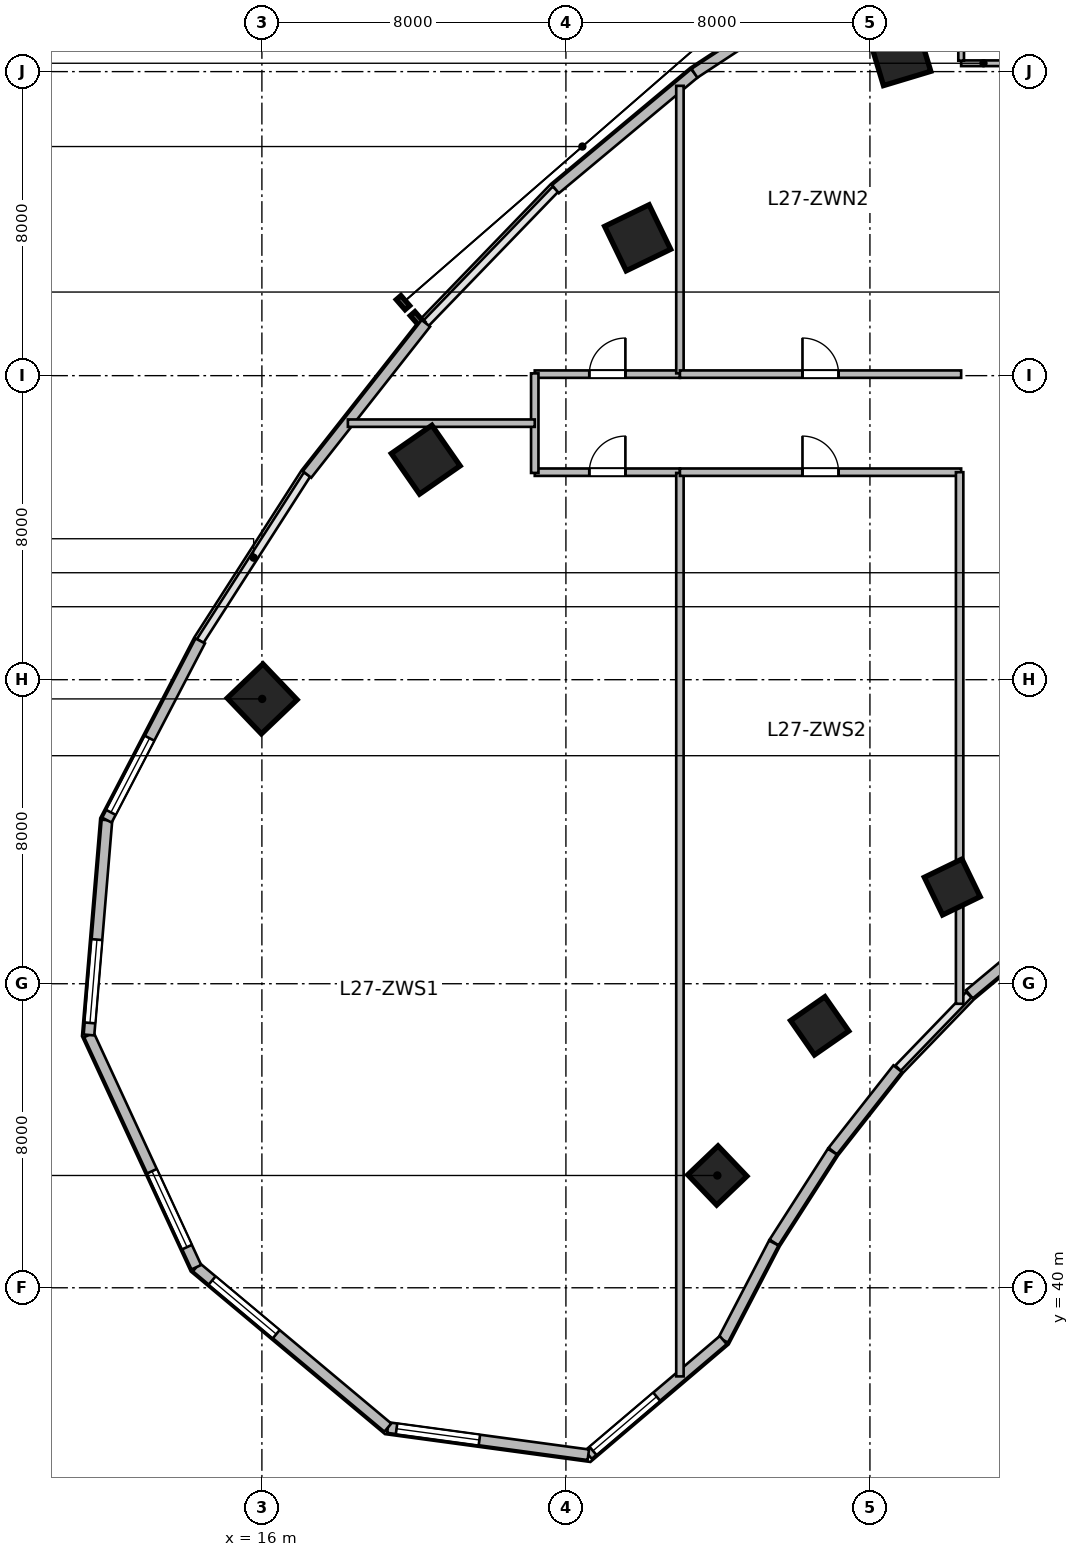
"""IFC4 building model, lengths in metres.
Left out: names, types, materials, properties, quantities, classifications, styles, units other than length and angle.
Written with IfcOpenShell. Run it as: python <this file> out.ifc"""

import sys

from ifc_helpers import new_model, si_unit, direction, frame, frame_2d, origin, origin_2d, place, context, subcontext, project, spatial, rectangle, extrude, source, transform, mapped, element, fill, save


model = new_model("IFC4")
c1 = context("Model", 3, precision=1e-05, world=origin(), true_north=direction((0.0, 1.0)))
c2 = subcontext(c1, "Body", "Model", "MODEL_VIEW")
j1 = project(units=[si_unit("LENGTHUNIT", "METRE"), si_unit("PLANEANGLEUNIT", "RADIAN")], contexts=[c1])
p1 = place(None, origin())
s1 = spatial("IfcSite", under=j1, at=p1, CompositionType="ELEMENT")
p2 = place(p1, origin())
s2 = spatial("IfcBuilding", under=s1, at=p2, CompositionType="ELEMENT")
p3 = place(p2, frame((0.0, 0.0, 115.5)))
s3 = spatial("IfcBuildingStorey", under=s2, at=p3, CompositionType="ELEMENT", Elevation=115.5)
m1 = source(origin(), c2, "Body", "SweptSolid", [
    extrude(rectangle(XDim=1.1, YDim=1.1, at=origin_2d()), origin(), (0.0, 0.0, 1.0), 3.9),
])
p4 = place(p3, frame((27.985, 42.955, 0.0), z_axis=(0.0, 0.0, 1.0), x_axis=(-0.690756218984, 0.723087716626, 0.0)))
e1 = element("IfcColumn", 1, at=p4, inside=s3, PredefinedType="COLUMN", context=c2, shape_type="MappedRepresentation", body=[
    mapped(m1, transform((0.0, 0.0, 0.0), scale=1.0)),
])
m2 = source(origin(), c2, "Body", "SweptSolid", [
    extrude(rectangle(XDim=1.3, YDim=1.3, at=origin_2d()), origin(), (0.0, 0.0, 1.0), 3.9),
])
p5 = place(p3, frame((16.007, 55.494, 0.0), z_axis=(0.0, 0.0, 1.0), x_axis=(-0.690756218984, 0.723087716626, 0.0)))
e2 = element("IfcColumn", 2, at=p5, inside=s3, PredefinedType="COLUMN", context=c2, shape_type="MappedRepresentation", body=[
    mapped(m2, transform((0.0, 0.0, 0.0), scale=1.0)),
])
p6 = place(p3, frame((30.677, 46.892, 0.0), z_axis=(0.0, 0.0, 1.0), x_axis=(-0.571143442153, 0.820850271661, 0.0)))
e3 = element("IfcColumn", 3, at=p6, inside=s3, PredefinedType="COLUMN", context=c2, shape_type="MappedRepresentation", body=[
    mapped(m1, transform((0.0, 0.0, 0.0), scale=1.0)),
])
p7 = place(p3, frame((20.311, 61.789, 0.0), z_axis=(0.0, 0.0, 1.0), x_axis=(-0.571143442153, 0.820850271661, 0.0)))
e4 = element("IfcColumn", 4, at=p7, inside=s3, PredefinedType="COLUMN", context=c2, shape_type="MappedRepresentation", body=[
    mapped(m2, transform((0.0, 0.0, 0.0), scale=1.0)),
])
p8 = place(p3, frame((34.166, 50.545, 0.0), z_axis=(0.0, 0.0, 1.0), x_axis=(-0.436173672171, 0.899862504889, 0.0)))
e5 = element("IfcColumn", 5, at=p8, inside=s3, PredefinedType="COLUMN", context=c2, shape_type="MappedRepresentation", body=[
    mapped(m1, transform((0.0, 0.0, 0.0), scale=1.0)),
])
for number, where, z_axis, x_axis in (
    (6, (25.888, 67.627, 0.0), (0.0, 0.0, 1.0), (-0.436, 0.9, 0.0)),
    (7, (32.791, 72.442, 0.0), (0.0, 0.0, 1.0), (-0.289, 0.957, 0.0)),
):
    element("IfcColumn", number, at=place(p3, frame(where, z_axis=z_axis, x_axis=x_axis)), inside=s3, PredefinedType="COLUMN", context=c2, shape_type="MappedRepresentation", body=[
        mapped(m2, transform((0.0, 0.0, 0.0), scale=1.0)),
    ])
m3 = source(origin(), c2, "Body", "SweptSolid", [
    extrude(rectangle(XDim=2.601, YDim=0.28, at=frame_2d((1.3, 0.0))), origin(), (0.0, 0.0, 1.0), 3.65),
])
p9 = place(p3, frame((36.613, 49.387, 0.0), z_axis=(0.0, 0.0, 1.0), x_axis=(-0.76796730295, -0.640489048775, 0.0)))
e8 = element("IfcWall", 8, at=p9, inside=s3, PredefinedType="SOLIDWALL", context=c2, shape_type="MappedRepresentation", body=[
    mapped(m3, transform((0.0, 0.0, 0.0), scale=1.0)),
])
m4 = source(origin(), c2, "Body", "SweptSolid", [
    extrude(rectangle(XDim=2.76, YDim=0.28, at=frame_2d((1.38, 0.0))), origin(), (0.0, 0.0, 1.0), 3.65),
])
p10 = place(p3, frame((32.728, 45.766, 0.0), z_axis=(0.0, 0.0, 1.0), x_axis=(-0.618180818641, -0.786035925047, 0.0)))
e9 = element("IfcWall", 9, at=p10, inside=s3, PredefinedType="SOLIDWALL", context=c2, shape_type="MappedRepresentation", body=[
    mapped(m4, transform((0.0, 0.0, 0.0), scale=1.0)),
])
m5 = source(origin(), c2, "Body", "SweptSolid", [
    extrude(rectangle(XDim=2.84, YDim=0.28, at=frame_2d((1.42, 0.0))), origin(), (0.0, 0.0, 1.0), 3.65),
])
p11 = place(p3, frame((31.011, 43.582, 0.0), z_axis=(0.0, 0.0, 1.0), x_axis=(-0.540214368057, -0.841527442538, 0.0)))
e10 = element("IfcWall", 10, at=p11, inside=s3, PredefinedType="SOLIDWALL", context=c2, shape_type="MappedRepresentation", body=[
    mapped(m5, transform((0.0, 0.0, 0.0), scale=1.0)),
])
m6 = source(origin(), c2, "Body", "SweptSolid", [
    extrude(rectangle(XDim=2.88, YDim=0.28, at=frame_2d((1.44, 0.0))), origin(), (0.0, 0.0, 1.0), 3.65),
])
p12 = place(p3, frame((29.469, 41.178, 0.0), z_axis=(0.0, 0.0, 1.0), x_axis=(-0.461769086658, -0.887000175088, 0.0)))
e11 = element("IfcWall", 11, at=p12, inside=s3, PredefinedType="SOLIDWALL", context=c2, shape_type="MappedRepresentation", body=[
    mapped(m6, transform((0.0, 0.0, 0.0), scale=1.0)),
])
m7 = source(origin(), c2, "Body", "SweptSolid", [
    extrude(rectangle(XDim=4.659, YDim=0.28, at=frame_2d((2.33, 0.0))), origin(), (0.0, 0.0, 1.0), 3.65),
])
p13 = place(p3, frame((28.139, 38.624, 0.0), z_axis=(0.0, 0.0, 1.0), x_axis=(-0.761913458795, -0.647678841176, 0.0)))
e12 = element("IfcWall", 12, at=p13, inside=s3, PredefinedType="SOLIDWALL", context=c2, shape_type="MappedRepresentation", body=[
    mapped(m7, transform((0.0, 0.0, 0.0), scale=1.0)),
])
p14 = place(p13, frame((2.299, 0.0, 0.95)))
e13 = element("IfcOpeningElement", 13, at=p14, cuts=e12, PredefinedType="OPENING", context=c2, shape_type="SweptSolid", body=[
    extrude(rectangle(XDim=2.2, YDim=2.1, at=frame_2d((1.1, 1.05))), frame((0.0, 0.15, 0.0), z_axis=(0.0, -1.0, 0.0), x_axis=(1.0, 0.0, 0.0)), (0.0, 0.0, 1.0), 0.3),
])
m8 = source(origin(), c2, "Body", "SweptSolid", [
    extrude(rectangle(XDim=5.324, YDim=0.28, at=frame_2d((2.662, 0.0))), origin(), (0.0, 0.0, 1.0), 3.65),
])
p15 = place(p3, frame((24.59, 35.606, 0.0), z_axis=(0.0, 0.0, 1.0), x_axis=(-0.990931467223, 0.134368252451, 0.0)))
e14 = element("IfcWall", 14, at=p15, inside=s3, PredefinedType="SOLIDWALL", context=c2, shape_type="MappedRepresentation", body=[
    mapped(m8, transform((0.0, 0.0, 0.0), scale=1.0)),
])
p16 = place(p15, frame((2.893, 0.0, 0.95)))
e15 = element("IfcOpeningElement", 15, at=p16, cuts=e14, PredefinedType="OPENING", context=c2, shape_type="SweptSolid", body=[
    extrude(rectangle(XDim=2.2, YDim=2.1, at=frame_2d((1.1, 1.05))), frame((0.0, 0.15, 0.0), z_axis=(0.0, -1.0, 0.0), x_axis=(1.0, 0.0, 0.0)), (0.0, 0.0, 1.0), 0.3),
])
m9 = source(origin(), c2, "Body", "SweptSolid", [
    extrude(rectangle(XDim=6.573, YDim=0.28, at=frame_2d((3.287, 0.0))), origin(), (0.0, 0.0, 1.0), 3.65),
])
p17 = place(p3, frame((19.314, 36.322, 0.0), z_axis=(0.0, 0.0, 1.0), x_axis=(-0.766715154163, 0.641987439423, 0.0)))
e16 = element("IfcWall", 16, at=p17, inside=s3, PredefinedType="SOLIDWALL", context=c2, shape_type="MappedRepresentation", body=[
    mapped(m9, transform((0.0, 0.0, 0.0), scale=1.0)),
])
p18 = place(p17, frame((3.83, 0.0, 0.95)))
e17 = element("IfcOpeningElement", 17, at=p18, cuts=e16, PredefinedType="OPENING", context=c2, shape_type="SweptSolid", body=[
    extrude(rectangle(XDim=2.2, YDim=2.1, at=frame_2d((1.1, 1.05))), frame((0.0, 0.15, 0.0), z_axis=(0.0, -1.0, 0.0), x_axis=(1.0, 0.0, 0.0)), (0.0, 0.0, 1.0), 0.3),
])
m10 = source(origin(), c2, "Body", "SweptSolid", [
    extrude(rectangle(XDim=6.732, YDim=0.28, at=frame_2d((3.366, 0.0))), origin(), (0.0, 0.0, 1.0), 3.65),
])
p19 = place(p3, frame((14.275, 40.541, 0.0), z_axis=(0.0, 0.0, 1.0), x_axis=(-0.419644552709, 0.907688520023, 0.0)))
e18 = element("IfcWall", 18, at=p19, inside=s3, PredefinedType="SOLIDWALL", context=c2, shape_type="MappedRepresentation", body=[
    mapped(m10, transform((0.0, 0.0, 0.0), scale=1.0)),
])
p20 = place(p19, frame((0.583, 0.0, 0.95)))
e19 = element("IfcOpeningElement", 19, at=p20, cuts=e18, PredefinedType="OPENING", context=c2, shape_type="SweptSolid", body=[
    extrude(rectangle(XDim=2.2, YDim=2.1, at=frame_2d((1.1, 1.05))), frame((0.0, 0.15, 0.0), z_axis=(0.0, -1.0, 0.0), x_axis=(1.0, 0.0, 0.0)), (0.0, 0.0, 1.0), 0.3),
])
m11 = source(origin(), c2, "Body", "SweptSolid", [
    extrude(rectangle(XDim=5.674, YDim=0.28, at=frame_2d((2.837, 0.0))), origin(), (0.0, 0.0, 1.0), 3.65),
])
p21 = place(p3, frame((11.45, 46.652, 0.0), z_axis=(0.0, 0.0, 1.0), x_axis=(0.083309007867, 0.996523762491, 0.0)))
e20 = element("IfcWall", 20, at=p21, inside=s3, PredefinedType="SOLIDWALL", context=c2, shape_type="MappedRepresentation", body=[
    mapped(m11, transform((0.0, 0.0, 0.0), scale=1.0)),
])
p22 = place(p21, frame((0.318, 0.0, 0.95)))
e21 = element("IfcOpeningElement", 21, at=p22, cuts=e20, PredefinedType="OPENING", context=c2, shape_type="SweptSolid", body=[
    extrude(rectangle(XDim=2.2, YDim=2.1, at=frame_2d((1.1, 1.05))), frame((0.0, 0.15, 0.0), z_axis=(0.0, -1.0, 0.0), x_axis=(1.0, 0.0, 0.0)), (0.0, 0.0, 1.0), 0.3),
])
m12 = source(origin(), c2, "Body", "SweptSolid", [
    extrude(rectangle(XDim=5.315, YDim=0.28, at=frame_2d((2.658, 0.0))), origin(), (0.0, 0.0, 1.0), 3.65),
])
p23 = place(p3, frame((11.922, 52.305, 0.0), z_axis=(0.0, 0.0, 1.0), x_axis=(0.461760527822, 0.887004630735, 0.0)))
e22 = element("IfcWall", 22, at=p23, inside=s3, PredefinedType="SOLIDWALL", context=c2, shape_type="MappedRepresentation", body=[
    mapped(m12, transform((0.0, 0.0, 0.0), scale=1.0)),
])
p24 = place(p23, frame((0.229, 0.0, 0.95)))
e23 = element("IfcOpeningElement", 23, at=p24, cuts=e22, PredefinedType="OPENING", context=c2, shape_type="SweptSolid", body=[
    extrude(rectangle(XDim=2.2, YDim=2.1, at=frame_2d((1.1, 1.05))), frame((0.0, 0.15, 0.0), z_axis=(0.0, -1.0, 0.0), x_axis=(1.0, 0.0, 0.0)), (0.0, 0.0, 1.0), 0.3),
])
m13 = source(origin(), c2, "Body", "SweptSolid", [
    extrude(rectangle(XDim=5.058, YDim=0.28, at=frame_2d((2.529, 0.0))), origin(), (0.0, 0.0, 1.0), 3.65),
])
p25 = place(p3, frame((17.188, 61.4, 0.0), z_axis=(0.0, 0.0, 1.0), x_axis=(0.618145507434, 0.786063694391, 0.0)))
e24 = element("IfcWall", 24, at=p25, inside=s3, PredefinedType="SOLIDWALL", context=c2, shape_type="MappedRepresentation", body=[
    mapped(m13, transform((0.0, 0.0, 0.0), scale=1.0)),
])
m14 = source(origin(), c2, "Body", "SweptSolid", [
    extrude(rectangle(XDim=4.762, YDim=0.28, at=frame_2d((2.381, 0.0))), origin(), (0.0, 0.0, 1.0), 3.65),
])
p26 = place(p3, frame((23.725, 68.907, 0.0), z_axis=(0.0, 0.0, 1.0), x_axis=(0.767952279762, 0.640507061638, 0.0)))
e25 = element("IfcWall", 25, at=p26, inside=s3, PredefinedType="SOLIDWALL", context=c2, shape_type="MappedRepresentation", body=[
    mapped(m14, transform((0.0, 0.0, 0.0), scale=1.0)),
])
m15 = source(origin(), c2, "Body", "SweptSolid", [
    extrude(rectangle(XDim=4.626, YDim=0.28, at=frame_2d((2.313, 0.0))), origin(), (0.0, 0.0, 1.0), 3.65),
])
p27 = place(p3, frame((27.382, 71.958, 0.0), z_axis=(0.0, 0.0, 1.0), x_axis=(0.83595938331, 0.548791316855, 0.0)))
e26 = element("IfcWall", 26, at=p27, inside=s3, PredefinedType="SOLIDWALL", context=c2, shape_type="MappedRepresentation", body=[
    mapped(m15, transform((0.0, 0.0, 0.0), scale=1.0)),
])
m16 = source(origin(), c2, "Body", "SweptSolid", [
    extrude(rectangle(XDim=2.1, YDim=0.15, at=frame_2d((1.05, 0.0))), origin(), (0.0, 0.0, 1.0), 3.65),
])
p28 = place(p3, frame((34.4, 72.22, 0.0), z_axis=(0.0, 0.0, 1.0), x_axis=(1.0, 0.0, 0.0)))
e27 = element("IfcWall", 27, at=p28, inside=s3, PredefinedType="PARTITIONING", context=c2, shape_type="MappedRepresentation", body=[
    mapped(m16, transform((0.0, 0.0, 0.0), scale=1.0)),
])
m17 = source(origin(), c2, "Body", "SweptSolid", [
    extrude(rectangle(XDim=1.995, YDim=0.15, at=frame_2d((0.998, 0.0))), origin(), (0.0, 0.0, 1.0), 3.65),
])
p29 = place(p3, frame((34.4, 72.288, 0.0), z_axis=(0.0, 0.0, 1.0), x_axis=(0.0, 1.0, 0.0)))
e28 = element("IfcWall", 28, at=p29, inside=s3, PredefinedType="PARTITIONING", context=c2, shape_type="MappedRepresentation", body=[
    mapped(m17, transform((0.0, 0.0, 0.0), scale=1.0)),
])
m18 = source(origin(), c2, "Body", "SweptSolid", [
    extrude(rectangle(XDim=3.82, YDim=0.195, at=frame_2d((1.91, 0.0))), origin(), (0.0, 0.0, 1.0), 3.65),
])
p30 = place(p3, frame((23.18, 64.04, 0.0), z_axis=(0.0, 0.0, 1.0), x_axis=(1.0, 0.0, 0.0)))
e29 = element("IfcWall", 29, at=p30, inside=s3, PredefinedType="PARTITIONING", context=c2, shape_type="MappedRepresentation", body=[
    mapped(m18, transform((0.0, 0.0, 0.0), scale=1.0)),
])
p31 = place(p30, frame((1.435, 0.0, 0.0)))
e30 = element("IfcOpeningElement", 30, at=p31, cuts=e29, PredefinedType="OPENING", context=c2, shape_type="SweptSolid", body=[
    extrude(rectangle(XDim=0.95, YDim=2.1, at=frame_2d((0.475, 1.05))), frame((0.0, 0.107, 0.0), z_axis=(0.0, -1.0, 0.0), x_axis=(1.0, 0.0, 0.0)), (0.0, 0.0, 1.0), 0.215),
])
m19 = source(origin(), c2, "Body", "SweptSolid", [
    extrude(rectangle(XDim=7.566, YDim=0.195, at=frame_2d((3.783, 0.0))), origin(), (0.0, 0.0, 1.0), 2.942),
])
p32 = place(p3, frame((27.0, 64.06, 0.0), z_axis=(0.0, 0.0, 1.0), x_axis=(0.0, 1.0, 0.0)))
e31 = element("IfcWall", 31, at=p32, inside=s3, PredefinedType="PARTITIONING", context=c2, shape_type="MappedRepresentation", body=[
    mapped(m19, transform((0.0, 0.0, 0.0), scale=1.0)),
])
m20 = source(origin(), c2, "Body", "SweptSolid", [
    extrude(rectangle(XDim=7.4, YDim=0.195, at=frame_2d((3.7, 0.0))), origin(), (0.0, 0.0, 1.0), 3.65),
])
p33 = place(p3, frame((27.0, 64.04, 0.0), z_axis=(0.0, 0.0, 1.0), x_axis=(1.0, 0.0, 0.0)))
e32 = element("IfcWall", 32, at=p33, inside=s3, PredefinedType="PARTITIONING", context=c2, shape_type="MappedRepresentation", body=[
    mapped(m20, transform((0.0, 0.0, 0.0), scale=1.0)),
])
p34 = place(p33, frame((3.225, 0.0, 0.0)))
e33 = element("IfcOpeningElement", 33, at=p34, cuts=e32, PredefinedType="OPENING", context=c2, shape_type="SweptSolid", body=[
    extrude(rectangle(XDim=0.95, YDim=2.1, at=frame_2d((0.475, 1.05))), frame((0.0, 0.107, 0.0), z_axis=(0.0, -1.0, 0.0), x_axis=(1.0, 0.0, 0.0)), (0.0, 0.0, 1.0), 0.215),
])
p35 = place(p3, frame((23.18, 61.46, 0.0), z_axis=(0.0, 0.0, 1.0), x_axis=(1.0, 0.0, 0.0)))
e34 = element("IfcWall", 34, at=p35, inside=s3, PredefinedType="PARTITIONING", context=c2, shape_type="MappedRepresentation", body=[
    mapped(m18, transform((0.0, 0.0, 0.0), scale=1.0)),
])
p36 = place(p35, frame((1.435, 0.0, 0.0)))
e35 = element("IfcOpeningElement", 35, at=p36, cuts=e34, PredefinedType="OPENING", context=c2, shape_type="SweptSolid", body=[
    extrude(rectangle(XDim=0.95, YDim=2.1, at=frame_2d((0.475, 1.05))), frame((0.0, 0.107, 0.0), z_axis=(0.0, -1.0, 0.0), x_axis=(1.0, 0.0, 0.0)), (0.0, 0.0, 1.0), 0.215),
])
m21 = source(origin(), c2, "Body", "SweptSolid", [
    extrude(rectangle(XDim=23.771, YDim=0.195, at=frame_2d((11.886, 0.0))), origin(), (0.0, 0.0, 1.0), 2.942),
])
p37 = place(p3, frame((27.0, 37.668, 0.0), z_axis=(0.0, 0.0, 1.0), x_axis=(0.0, 1.0, 0.0)))
e36 = element("IfcWall", 36, at=p37, inside=s3, PredefinedType="PARTITIONING", context=c2, shape_type="MappedRepresentation", body=[
    mapped(m21, transform((0.0, 0.0, 0.0), scale=1.0)),
])
p38 = place(p3, frame((27.0, 61.46, 0.0), z_axis=(0.0, 0.0, 1.0), x_axis=(1.0, 0.0, 0.0)))
e37 = element("IfcWall", 37, at=p38, inside=s3, PredefinedType="PARTITIONING", context=c2, shape_type="MappedRepresentation", body=[
    mapped(m20, transform((0.0, 0.0, 0.0), scale=1.0)),
])
p39 = place(p38, frame((3.225, 0.0, 0.0)))
e38 = element("IfcOpeningElement", 38, at=p39, cuts=e37, PredefinedType="OPENING", context=c2, shape_type="SweptSolid", body=[
    extrude(rectangle(XDim=0.95, YDim=2.1, at=frame_2d((0.475, 1.05))), frame((0.0, 0.107, 0.0), z_axis=(0.0, -1.0, 0.0), x_axis=(1.0, 0.0, 0.0)), (0.0, 0.0, 1.0), 0.215),
])
m22 = source(origin(), c2, "Body", "SweptSolid", [
    extrude(rectangle(XDim=13.988, YDim=0.195, at=frame_2d((6.994, 0.0))), origin(), (0.0, 0.0, 1.0), 3.65),
])
p40 = place(p3, frame((34.36, 47.472, 0.0), z_axis=(0.0, 0.0, 1.0), x_axis=(0.0, 1.0, 0.0)))
e39 = element("IfcWall", 39, at=p40, inside=s3, PredefinedType="PARTITIONING", context=c2, shape_type="MappedRepresentation", body=[
    mapped(m22, transform((0.0, 0.0, 0.0), scale=1.0)),
])
m23 = source(origin(), c2, "Body", "SweptSolid", [
    extrude(rectangle(XDim=2.62, YDim=0.195, at=frame_2d((1.31, 0.0))), origin(), (0.0, 0.0, 1.0), 3.65),
])
p41 = place(p3, frame((23.18, 61.44, 0.0), z_axis=(0.0, 0.0, 1.0), x_axis=(0.0, 1.0, 0.0)))
e40 = element("IfcWall", 40, at=p41, inside=s3, PredefinedType="PARTITIONING", context=c2, shape_type="MappedRepresentation", body=[
    mapped(m23, transform((0.0, 0.0, 0.0), scale=1.0)),
])
m24 = source(origin(), c2, "Body", "SweptSolid", [
    extrude(rectangle(XDim=4.917, YDim=0.195, at=frame_2d((2.459, 0.0))), origin(), (0.0, 0.0, 1.0), 3.65),
])
p42 = place(p3, frame((18.262, 62.75, 0.0), z_axis=(0.0, 0.0, 1.0), x_axis=(1.0, 0.0, 0.0)))
e41 = element("IfcWall", 41, at=p42, inside=s3, PredefinedType="PARTITIONING", context=c2, shape_type="MappedRepresentation", body=[
    mapped(m24, transform((0.0, 0.0, 0.0), scale=1.0)),
])
m25 = source(origin(), c2, "Body", "SweptSolid", [
    extrude(rectangle(XDim=2.2, YDim=2.1, at=frame_2d((1.1, 1.05))), frame((0.0, 0.03, 0.0), z_axis=(0.0, -1.0, 0.0), x_axis=(1.0, 0.0, 0.0)), (0.0, 0.0, 1.0), 0.06),
])
p43 = place(p14, origin())
e42 = element("IfcWindow", 42, at=p43, inside=s3, PartitioningType="TRIPLE_PANEL_VERTICAL", PredefinedType="WINDOW", context=c2, shape_type="MappedRepresentation", body=[
    mapped(m25, transform((0.0, 0.0, 0.0), scale=1.0)),
])
fill(e13, e42)
p44 = place(p16, origin())
e43 = element("IfcWindow", 43, at=p44, inside=s3, PartitioningType="TRIPLE_PANEL_VERTICAL", PredefinedType="WINDOW", context=c2, shape_type="MappedRepresentation", body=[
    mapped(m25, transform((0.0, 0.0, 0.0), scale=1.0)),
])
fill(e15, e43)
p45 = place(p18, origin())
e44 = element("IfcWindow", 44, at=p45, inside=s3, PartitioningType="TRIPLE_PANEL_VERTICAL", PredefinedType="WINDOW", context=c2, shape_type="MappedRepresentation", body=[
    mapped(m25, transform((0.0, 0.0, 0.0), scale=1.0)),
])
fill(e17, e44)
p46 = place(p20, origin())
e45 = element("IfcWindow", 45, at=p46, inside=s3, PartitioningType="TRIPLE_PANEL_VERTICAL", PredefinedType="WINDOW", context=c2, shape_type="MappedRepresentation", body=[
    mapped(m25, transform((0.0, 0.0, 0.0), scale=1.0)),
])
fill(e19, e45)
p47 = place(p22, origin())
e46 = element("IfcWindow", 46, at=p47, inside=s3, PartitioningType="TRIPLE_PANEL_VERTICAL", PredefinedType="WINDOW", context=c2, shape_type="MappedRepresentation", body=[
    mapped(m25, transform((0.0, 0.0, 0.0), scale=1.0)),
])
fill(e21, e46)
p48 = place(p24, origin())
e47 = element("IfcWindow", 47, at=p48, inside=s3, PartitioningType="TRIPLE_PANEL_VERTICAL", PredefinedType="WINDOW", context=c2, shape_type="MappedRepresentation", body=[
    mapped(m25, transform((0.0, 0.0, 0.0), scale=1.0)),
])
fill(e23, e47)
m26 = source(origin(), c2, "Body", "SweptSolid", [
    extrude(rectangle(XDim=0.95, YDim=2.1, at=frame_2d((0.475, 1.05))), frame((0.0, 0.025, 0.0), z_axis=(0.0, -1.0, 0.0), x_axis=(1.0, 0.0, 0.0)), (0.0, 0.0, 1.0), 0.05),
])
p49 = place(p31, origin())
e48 = element("IfcDoor", 48, at=p49, inside=s3, OperationType="SINGLE_SWING_RIGHT", PredefinedType="DOOR", context=c2, shape_type="MappedRepresentation", body=[
    mapped(m26, transform((0.0, 0.0, 0.0), scale=1.0)),
])
fill(e30, e48)
p50 = place(p34, origin())
e49 = element("IfcDoor", 49, at=p50, inside=s3, OperationType="SINGLE_SWING_LEFT", PredefinedType="DOOR", context=c2, shape_type="MappedRepresentation", body=[
    mapped(m26, transform((0.0, 0.0, 0.0), scale=1.0)),
])
fill(e33, e49)
p51 = place(p36, origin())
e50 = element("IfcDoor", 50, at=p51, inside=s3, OperationType="SINGLE_SWING_RIGHT", PredefinedType="DOOR", context=c2, shape_type="MappedRepresentation", body=[
    mapped(m26, transform((0.0, 0.0, 0.0), scale=1.0)),
])
fill(e35, e50)
p52 = place(p39, origin())
e51 = element("IfcDoor", 51, at=p52, inside=s3, OperationType="SINGLE_SWING_LEFT", PredefinedType="DOOR", context=c2, shape_type="MappedRepresentation", body=[
    mapped(m26, transform((0.0, 0.0, 0.0), scale=1.0)),
])
fill(e38, e51)
save(model, sys.argv[1])
